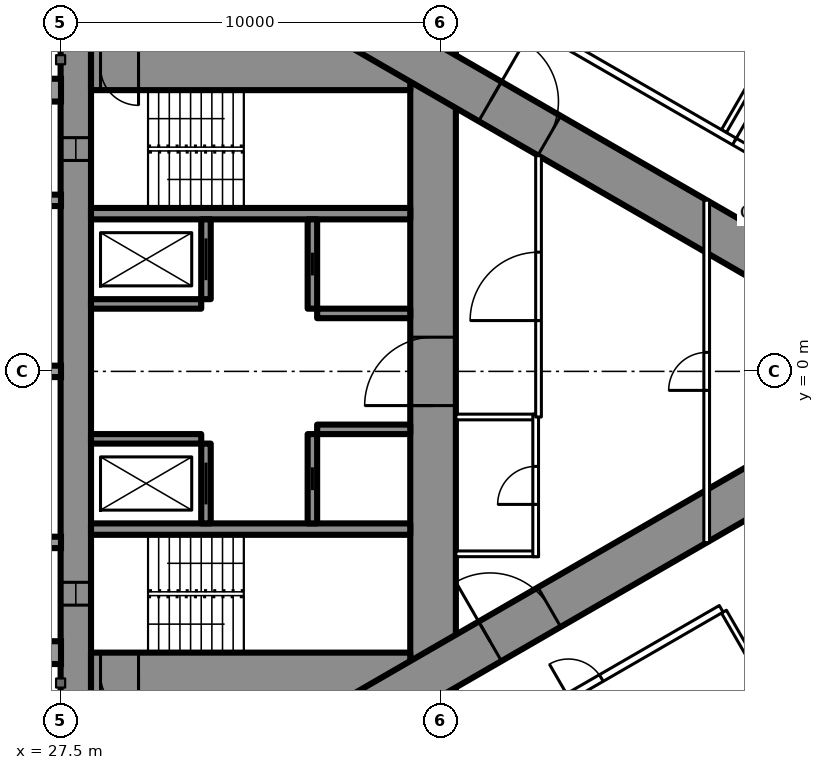
"""IFC4 building model, lengths in metres.
Left out: names, types, materials, properties, quantities, classifications, styles, units other than length and angle.
Written with IfcOpenShell. Run it as: python <this file> out.ifc"""

import sys

from ifc_helpers import new_model, si_unit, direction, frame, frame_2d, origin, place, context, subcontext, project, spatial, rectangle, extrude, element, fill, save


model = new_model("IFC4")
c1 = context("Model", 3, precision=1e-05, world=origin(), true_north=direction((0.0, 1.0)))
c2 = subcontext(c1, "Body", "Model", "MODEL_VIEW")
j1 = project(units=[si_unit("LENGTHUNIT", "METRE"), si_unit("PLANEANGLEUNIT", "RADIAN")], contexts=[c1])
p1 = place(None, origin())
s1 = spatial("IfcSite", under=j1, at=p1, CompositionType="ELEMENT")
p2 = place(p1, origin())
s2 = spatial("IfcBuilding", under=s1, at=p2, CompositionType="ELEMENT")
p3 = place(p2, frame((0.0, 0.0, 101.1)))
s3 = spatial("IfcBuildingStorey", under=s2, at=p3, CompositionType="ELEMENT", Elevation=101.1)
p4 = place(p3, frame((27.9, -8.6, 0.0), z_axis=(0.0, 0.0, 1.0), x_axis=(0.0, 1.0, 0.0)))
e1 = element("IfcWall", 1, at=p4, inside=s3, PredefinedType="SHEAR", context=c2, shape_type="SweptSolid", body=[
    extrude(rectangle(XDim=17.2, YDim=0.8, at=frame_2d((8.6, 0.0))), origin(), (0.0, 0.0, 1.0), 3.5),
])
p5 = place(p4, frame((2.45, 0.0, 0.6)))
e2 = element("IfcOpeningElement", 2, at=p5, cuts=e1, PredefinedType="OPENING", context=c2, shape_type="SweptSolid", body=[
    extrude(rectangle(XDim=0.6, YDim=2.1, at=frame_2d((0.3, 1.05))), frame((0.0, 0.41, 0.0), z_axis=(0.0, -1.0, 0.0), x_axis=(1.0, 0.0, 0.0)), (0.0, 0.0, 1.0), 0.82),
])
p6 = place(p4, frame((14.15, 0.0, 0.6)))
e3 = element("IfcOpeningElement", 3, at=p6, cuts=e1, PredefinedType="OPENING", context=c2, shape_type="SweptSolid", body=[
    extrude(rectangle(XDim=0.6, YDim=2.1, at=frame_2d((0.3, 1.05))), frame((0.0, 0.41, 0.0), z_axis=(0.0, -1.0, 0.0), x_axis=(1.0, 0.0, 0.0)), (0.0, 0.0, 1.0), 0.82),
])
p7 = place(p3, frame((37.3, -8.6, 0.0), z_axis=(0.0, 0.0, 1.0), x_axis=(0.0, 1.0, 0.0)))
e4 = element("IfcWall", 4, at=p7, inside=s3, PredefinedType="SHEAR", context=c2, shape_type="SweptSolid", body=[
    extrude(rectangle(XDim=17.2, YDim=1.2, at=frame_2d((8.6, 0.0))), origin(), (0.0, 0.0, 1.0), 3.5),
])
p8 = place(p7, frame((7.7, 0.0, 0.0)))
e5 = element("IfcOpeningElement", 5, at=p8, cuts=e4, PredefinedType="OPENING", context=c2, shape_type="SweptSolid", body=[
    extrude(rectangle(XDim=1.8, YDim=2.2, at=frame_2d((0.9, 1.1))), frame((0.0, 0.61, 0.0), z_axis=(0.0, -1.0, 0.0), x_axis=(1.0, 0.0, 0.0)), (0.0, 0.0, 1.0), 1.22),
])
p9 = place(p3, frame((28.3, -8.0, 0.0), z_axis=(0.0, 0.0, 1.0), x_axis=(1.0, 0.0, 0.0)))
e6 = element("IfcWall", 6, at=p9, inside=s3, PredefinedType="SHEAR", context=c2, shape_type="SweptSolid", body=[
    extrude(rectangle(XDim=8.4, YDim=1.2, at=frame_2d((4.2, 0.0))), origin(), (0.0, 0.0, 1.0), 3.5),
])
p10 = place(p9, frame((0.25, 0.0, 0.0)))
e7 = element("IfcOpeningElement", 7, at=p10, cuts=e6, PredefinedType="OPENING", context=c2, shape_type="SweptSolid", body=[
    extrude(rectangle(XDim=1.0, YDim=2.2, at=frame_2d((0.5, 1.1))), frame((0.0, 0.61, 0.0), z_axis=(0.0, -1.0, 0.0), x_axis=(1.0, 0.0, 0.0)), (0.0, 0.0, 1.0), 1.22),
])
p11 = place(p3, frame((28.3, 8.0, 0.0), z_axis=(0.0, 0.0, 1.0), x_axis=(1.0, 0.0, 0.0)))
e8 = element("IfcWall", 8, at=p11, inside=s3, PredefinedType="SHEAR", context=c2, shape_type="SweptSolid", body=[
    extrude(rectangle(XDim=8.4, YDim=1.2, at=frame_2d((4.2, 0.0))), origin(), (0.0, 0.0, 1.0), 3.5),
])
p12 = place(p11, frame((0.25, 0.0, 0.0)))
e9 = element("IfcOpeningElement", 9, at=p12, cuts=e8, PredefinedType="OPENING", context=c2, shape_type="SweptSolid", body=[
    extrude(rectangle(XDim=1.0, YDim=2.2, at=frame_2d((0.5, 1.1))), frame((0.0, 0.61, 0.0), z_axis=(0.0, -1.0, 0.0), x_axis=(1.0, 0.0, 0.0)), (0.0, 0.0, 1.0), 1.22),
])
for number, where, z_axis, x_axis in (
    (10, (28.3, -4.15, 0.0), (0.0, 0.0, 1.0), (1.0, 0.0, 0.0)),
    (11, (28.3, 4.15, 0.0), (0.0, 0.0, 1.0), (1.0, 0.0, 0.0)),
):
    element("IfcWall", number, at=place(p3, frame(where, z_axis=z_axis, x_axis=x_axis)), inside=s3, PredefinedType="SHEAR", context=c2, shape_type="SweptSolid", body=[
        extrude(rectangle(XDim=8.4, YDim=0.3, at=frame_2d((4.2, 0.0))), origin(), (0.0, 0.0, 1.0), 3.5),
    ])
p13 = place(p3, frame((31.325, -4.0, 0.0), z_axis=(0.0, 0.0, 1.0), x_axis=(0.0, 1.0, 0.0)))
e12 = element("IfcWall", 12, at=p13, inside=s3, PredefinedType="SHEAR", context=c2, shape_type="SweptSolid", body=[
    extrude(rectangle(XDim=2.1, YDim=0.25, at=frame_2d((1.05, 0.0))), origin(), (0.0, 0.0, 1.0), 3.5),
])
p14 = place(p13, frame((0.5, 0.0, 0.0)))
e13 = element("IfcOpeningElement", 13, at=p14, cuts=e12, PredefinedType="OPENING", context=c2, shape_type="SweptSolid", body=[
    extrude(rectangle(XDim=1.1, YDim=2.2, at=frame_2d((0.55, 1.1))), frame((0.0, 0.135, 0.0), z_axis=(0.0, -1.0, 0.0), x_axis=(1.0, 0.0, 0.0)), (0.0, 0.0, 1.0), 0.27),
])
p15 = place(p3, frame((34.125, -4.0, 0.0), z_axis=(0.0, 0.0, 1.0), x_axis=(0.0, 1.0, 0.0)))
e14 = element("IfcWall", 14, at=p15, inside=s3, PredefinedType="SHEAR", context=c2, shape_type="SweptSolid", body=[
    extrude(rectangle(XDim=2.35, YDim=0.25, at=frame_2d((1.175, 0.0))), origin(), (0.0, 0.0, 1.0), 3.5),
])
p16 = place(p15, frame((0.875, 0.0, 0.0)))
e15 = element("IfcOpeningElement", 15, at=p16, cuts=e14, PredefinedType="OPENING", context=c2, shape_type="SweptSolid", body=[
    extrude(rectangle(XDim=0.6, YDim=2.0, at=frame_2d((0.3, 1.0))), frame((0.0, 0.135, 0.0), z_axis=(0.0, -1.0, 0.0), x_axis=(1.0, 0.0, 0.0)), (0.0, 0.0, 1.0), 0.27),
])
p17 = place(p3, frame((28.3, -1.775, 0.0), z_axis=(0.0, 0.0, 1.0), x_axis=(1.0, 0.0, 0.0)))
e16 = element("IfcWall", 16, at=p17, inside=s3, PredefinedType="SHEAR", context=c2, shape_type="SweptSolid", body=[
    extrude(rectangle(XDim=2.9, YDim=0.25, at=frame_2d((1.45, 0.0))), origin(), (0.0, 0.0, 1.0), 3.5),
])
p18 = place(p3, frame((34.25, -1.525, 0.0), z_axis=(0.0, 0.0, 1.0), x_axis=(1.0, 0.0, 0.0)))
e17 = element("IfcWall", 17, at=p18, inside=s3, PredefinedType="SHEAR", context=c2, shape_type="SweptSolid", body=[
    extrude(rectangle(XDim=2.45, YDim=0.25, at=frame_2d((1.225, 0.0))), origin(), (0.0, 0.0, 1.0), 3.5),
])
p19 = place(p3, frame((31.325, 1.9, 0.0), z_axis=(0.0, 0.0, 1.0), x_axis=(0.0, 1.0, 0.0)))
e18 = element("IfcWall", 18, at=p19, inside=s3, PredefinedType="SHEAR", context=c2, shape_type="SweptSolid", body=[
    extrude(rectangle(XDim=2.1, YDim=0.25, at=frame_2d((1.05, 0.0))), origin(), (0.0, 0.0, 1.0), 3.5),
])
p20 = place(p19, frame((0.5, 0.0, 0.0)))
e19 = element("IfcOpeningElement", 19, at=p20, cuts=e18, PredefinedType="OPENING", context=c2, shape_type="SweptSolid", body=[
    extrude(rectangle(XDim=1.1, YDim=2.2, at=frame_2d((0.55, 1.1))), frame((0.0, 0.135, 0.0), z_axis=(0.0, -1.0, 0.0), x_axis=(1.0, 0.0, 0.0)), (0.0, 0.0, 1.0), 0.27),
])
p21 = place(p3, frame((34.125, 1.65, 0.0), z_axis=(0.0, 0.0, 1.0), x_axis=(0.0, 1.0, 0.0)))
e20 = element("IfcWall", 20, at=p21, inside=s3, PredefinedType="SHEAR", context=c2, shape_type="SweptSolid", body=[
    extrude(rectangle(XDim=2.35, YDim=0.25, at=frame_2d((1.175, 0.0))), origin(), (0.0, 0.0, 1.0), 3.5),
])
p22 = place(p21, frame((0.875, 0.0, 0.0)))
e21 = element("IfcOpeningElement", 21, at=p22, cuts=e20, PredefinedType="OPENING", context=c2, shape_type="SweptSolid", body=[
    extrude(rectangle(XDim=0.6, YDim=2.0, at=frame_2d((0.3, 1.0))), frame((0.0, 0.135, 0.0), z_axis=(0.0, -1.0, 0.0), x_axis=(1.0, 0.0, 0.0)), (0.0, 0.0, 1.0), 0.27),
])
p23 = place(p3, frame((28.3, 1.775, 0.0), z_axis=(0.0, 0.0, 1.0), x_axis=(1.0, 0.0, 0.0)))
e22 = element("IfcWall", 22, at=p23, inside=s3, PredefinedType="SHEAR", context=c2, shape_type="SweptSolid", body=[
    extrude(rectangle(XDim=2.9, YDim=0.25, at=frame_2d((1.45, 0.0))), origin(), (0.0, 0.0, 1.0), 3.5),
])
p24 = place(p3, frame((34.25, 1.525, 0.0), z_axis=(0.0, 0.0, 1.0), x_axis=(1.0, 0.0, 0.0)))
e23 = element("IfcWall", 23, at=p24, inside=s3, PredefinedType="SHEAR", context=c2, shape_type="SweptSolid", body=[
    extrude(rectangle(XDim=2.45, YDim=0.25, at=frame_2d((1.225, 0.0))), origin(), (0.0, 0.0, 1.0), 3.5),
])
p25 = place(p3, frame((27.2, -13.8, 0.0), z_axis=(0.0, 0.0, 1.0), x_axis=(0.866027159892, 0.499996958321, 0.0)))
e24 = element("IfcWall", 24, at=p25, inside=s3, PredefinedType="SHEAR", context=c2, shape_type="SweptSolid", body=[
    extrude(rectangle(XDim=27.947, YDim=1.2, at=frame_2d((13.973, 0.0))), origin(), (0.0, 0.0, 1.0), 3.5),
])
p26 = place(p25, frame((4.6, 0.0, 0.0)))
e25 = element("IfcOpeningElement", 25, at=p26, cuts=e24, PredefinedType="OPENING", context=c2, shape_type="SweptSolid", body=[
    extrude(rectangle(XDim=1.0, YDim=2.2, at=frame_2d((0.5, 1.1))), frame((0.0, 0.61, 0.0), z_axis=(0.0, -1.0, 0.0), x_axis=(1.0, 0.0, 0.0)), (0.0, 0.0, 1.0), 1.22),
])
p27 = place(p25, frame((13.395, 0.0, 0.0)))
e26 = element("IfcOpeningElement", 26, at=p27, cuts=e24, PredefinedType="OPENING", context=c2, shape_type="SweptSolid", body=[
    extrude(rectangle(XDim=1.8, YDim=2.2, at=frame_2d((0.9, 1.1))), frame((0.0, 0.61, 0.0), z_axis=(0.0, -1.0, 0.0), x_axis=(1.0, 0.0, 0.0)), (0.0, 0.0, 1.0), 1.22),
])
p28 = place(p3, frame((27.2, 13.8, 0.0), z_axis=(0.0, 0.0, 1.0), x_axis=(0.866024515034, -0.500001539357, 0.0)))
e27 = element("IfcWall", 27, at=p28, inside=s3, PredefinedType="SHEAR", context=c2, shape_type="SweptSolid", body=[
    extrude(rectangle(XDim=26.907, YDim=1.2, at=frame_2d((13.454, 0.0))), origin(), (0.0, 0.0, 1.0), 3.5),
])
p29 = place(p28, frame((4.6, 0.0, 0.0)))
e28 = element("IfcOpeningElement", 28, at=p29, cuts=e27, PredefinedType="OPENING", context=c2, shape_type="SweptSolid", body=[
    extrude(rectangle(XDim=1.0, YDim=2.2, at=frame_2d((0.5, 1.1))), frame((0.0, 0.61, 0.0), z_axis=(0.0, -1.0, 0.0), x_axis=(1.0, 0.0, 0.0)), (0.0, 0.0, 1.0), 1.22),
])
p30 = place(p28, frame((13.395, 0.0, 0.0)))
e29 = element("IfcOpeningElement", 29, at=p30, cuts=e27, PredefinedType="OPENING", context=c2, shape_type="SweptSolid", body=[
    extrude(rectangle(XDim=1.8, YDim=2.2, at=frame_2d((0.9, 1.1))), frame((0.0, 0.61, 0.0), z_axis=(0.0, -1.0, 0.0), x_axis=(1.0, 0.0, 0.0)), (0.0, 0.0, 1.0), 1.22),
])
p31 = place(p3, frame((44.954, -6.321, 0.0), z_axis=(0.0, 0.0, 1.0), x_axis=(0.500018676722, -0.866014620505, 0.0)))
e30 = element("IfcWall", 30, at=p31, inside=s3, PredefinedType="PARTITIONING", context=c2, shape_type="SweptSolid", body=[
    extrude(rectangle(XDim=8.704, YDim=0.15, at=frame_2d((4.352, 0.0))), origin(), (0.0, 0.0, 1.0), 2.2),
])
p32 = place(p3, frame((44.954, 6.321, 0.0), z_axis=(0.0, 0.0, 1.0), x_axis=(0.500009815811, 0.866019736549, 0.0)))
e31 = element("IfcWall", 31, at=p32, inside=s3, PredefinedType="PARTITIONING", context=c2, shape_type="SweptSolid", body=[
    extrude(rectangle(XDim=11.424, YDim=0.15, at=frame_2d((5.712, 0.0))), origin(), (0.0, 0.0, 1.0), 3.25),
])
p33 = place(p3, frame((36.834, 10.894, 0.0), z_axis=(0.0, 0.0, 1.0), x_axis=(0.866028157229, -0.499995230863, 0.0)))
e32 = element("IfcWall", 32, at=p33, inside=s3, PredefinedType="PARTITIONING", context=c2, shape_type="SweptSolid", body=[
    extrude(rectangle(XDim=21.667, YDim=0.2, at=frame_2d((10.833, 0.0))), origin(), (0.0, 0.0, 1.0), 3.25),
])
p34 = place(p33, frame((20.117, 0.0, 0.0)))
e33 = element("IfcOpeningElement", 33, at=p34, cuts=e32, PredefinedType="OPENING", context=c2, shape_type="SweptSolid", body=[
    extrude(rectangle(XDim=0.95, YDim=2.2, at=frame_2d((0.475, 1.1))), frame((0.0, 0.11, 0.0), z_axis=(0.0, -1.0, 0.0), x_axis=(1.0, 0.0, 0.0)), (0.0, 0.0, 1.0), 0.22),
])
p35 = place(p33, frame((14.335, 0.0, 0.0)))
e34 = element("IfcOpeningElement", 34, at=p35, cuts=e32, PredefinedType="OPENING", context=c2, shape_type="SweptSolid", body=[
    extrude(rectangle(XDim=0.95, YDim=2.2, at=frame_2d((0.475, 1.1))), frame((0.0, 0.11, 0.0), z_axis=(0.0, -1.0, 0.0), x_axis=(1.0, 0.0, 0.0)), (0.0, 0.0, 1.0), 0.22),
])
p36 = place(p33, frame((9.693, 0.0, 0.0)))
e35 = element("IfcOpeningElement", 35, at=p36, cuts=e32, PredefinedType="OPENING", context=c2, shape_type="SweptSolid", body=[
    extrude(rectangle(XDim=0.95, YDim=2.2, at=frame_2d((0.475, 1.1))), frame((0.0, 0.11, 0.0), z_axis=(0.0, -1.0, 0.0), x_axis=(1.0, 0.0, 0.0)), (0.0, 0.0, 1.0), 0.22),
])
p37 = place(p33, frame((2.95, 0.0, 0.0)))
e36 = element("IfcOpeningElement", 36, at=p37, cuts=e32, PredefinedType="OPENING", context=c2, shape_type="SweptSolid", body=[
    extrude(rectangle(XDim=0.95, YDim=2.2, at=frame_2d((0.475, 1.1))), frame((0.0, 0.11, 0.0), z_axis=(0.0, -1.0, 0.0), x_axis=(1.0, 0.0, 0.0)), (0.0, 0.0, 1.0), 0.22),
])
p38 = place(p3, frame((37.96, -10.243, 0.0), z_axis=(0.0, 0.0, 1.0), x_axis=(0.86603350054, 0.499985975746, 0.0)))
e37 = element("IfcWall", 37, at=p38, inside=s3, PredefinedType="PARTITIONING", context=c2, shape_type="SweptSolid", body=[
    extrude(rectangle(XDim=7.993, YDim=0.2, at=frame_2d((3.997, 0.0))), origin(), (0.0, 0.0, 1.0), 3.25),
])
p39 = place(p38, frame((3.35, 0.0, 0.0)))
e38 = element("IfcOpeningElement", 38, at=p39, cuts=e37, PredefinedType="OPENING", context=c2, shape_type="SweptSolid", body=[
    extrude(rectangle(XDim=1.0, YDim=2.2, at=frame_2d((0.5, 1.1))), frame((0.0, 0.11, 0.0), z_axis=(0.0, -1.0, 0.0), x_axis=(1.0, 0.0, 0.0)), (0.0, 0.0, 1.0), 0.22),
])
for number, where, z_axis, x_axis in (
    (39, (37.9, -1.2, 0.0), (0.0, 0.0, 1.0), (1.0, 0.0, 0.0)),
    (40, (37.9, -4.8, 0.0), (0.0, 0.0, 1.0), (1.0, 0.0, 0.0)),
):
    element("IfcWall", number, at=place(p3, frame(where, z_axis=z_axis, x_axis=x_axis)), inside=s3, PredefinedType="PARTITIONING", context=c2, shape_type="SweptSolid", body=[
        extrude(rectangle(XDim=2.175, YDim=0.15, at=frame_2d((1.087, 0.0))), origin(), (0.0, 0.0, 1.0), 3.25),
    ])
p40 = place(p3, frame((40.0, -4.875, 0.0), z_axis=(0.0, 0.0, 1.0), x_axis=(0.0, 1.0, 0.0)))
e41 = element("IfcWall", 41, at=p40, inside=s3, PredefinedType="PARTITIONING", context=c2, shape_type="SweptSolid", body=[
    extrude(rectangle(XDim=3.75, YDim=0.15, at=frame_2d((1.875, 0.0))), origin(), (0.0, 0.0, 1.0), 3.25),
])
p41 = place(p40, frame((1.375, 0.0, 0.0)))
e42 = element("IfcOpeningElement", 42, at=p41, cuts=e41, PredefinedType="OPENING", context=c2, shape_type="SweptSolid", body=[
    extrude(rectangle(XDim=1.0, YDim=2.2, at=frame_2d((0.5, 1.1))), frame((0.0, 0.085, 0.0), z_axis=(0.0, -1.0, 0.0), x_axis=(1.0, 0.0, 0.0)), (0.0, 0.0, 1.0), 0.17),
])
p42 = place(p3, frame((40.075, -1.2, 0.0), z_axis=(0.0, 0.0, 1.0), x_axis=(0.0, 1.0, 0.0)))
e43 = element("IfcWall", 43, at=p42, inside=s3, PredefinedType="PARTITIONING", context=c2, shape_type="SweptSolid", body=[
    extrude(rectangle(XDim=6.874, YDim=0.15, at=frame_2d((3.437, 0.0))), origin(), (0.0, 0.0, 1.0), 3.25),
])
p43 = place(p42, frame((2.537, 0.0, 0.0)))
e44 = element("IfcOpeningElement", 44, at=p43, cuts=e43, PredefinedType="OPENING", context=c2, shape_type="SweptSolid", body=[
    extrude(rectangle(XDim=1.8, YDim=2.2, at=frame_2d((0.9, 1.1))), frame((0.0, 0.085, 0.0), z_axis=(0.0, -1.0, 0.0), x_axis=(1.0, 0.0, 0.0)), (0.0, 0.0, 1.0), 0.17),
])
p44 = place(p3, frame((44.5, -4.505, 0.0), z_axis=(0.0, 0.0, 1.0), x_axis=(0.0, 1.0, 0.0)))
e45 = element("IfcWall", 45, at=p44, inside=s3, PredefinedType="PARTITIONING", context=c2, shape_type="SweptSolid", body=[
    extrude(rectangle(XDim=9.009, YDim=0.15, at=frame_2d((4.505, 0.0))), origin(), (0.0, 0.0, 1.0), 2.45),
])
p45 = place(p44, frame((4.005, 0.0, 0.0)))
e46 = element("IfcOpeningElement", 46, at=p45, cuts=e45, PredefinedType="OPENING", context=c2, shape_type="SweptSolid", body=[
    extrude(rectangle(XDim=1.0, YDim=2.2, at=frame_2d((0.5, 1.1))), frame((0.0, 0.085, 0.0), z_axis=(0.0, -1.0, 0.0), x_axis=(1.0, 0.0, 0.0)), (0.0, 0.0, 1.0), 0.17),
])
p46 = place(p36, origin())
e47 = element("IfcDoor", 47, at=p46, inside=s3, OperationType="SINGLE_SWING_LEFT", PredefinedType="DOOR", context=c2, shape_type="SweptSolid", body=[
    extrude(rectangle(XDim=0.95, YDim=2.2, at=frame_2d((0.475, 1.1))), frame((0.0, 0.025, 0.0), z_axis=(0.0, -1.0, 0.0), x_axis=(1.0, 0.0, 0.0)), (0.0, 0.0, 1.0), 0.05),
])
fill(e35, e47)
p47 = place(p39, origin())
e48 = element("IfcDoor", 48, at=p47, inside=s3, OperationType="SINGLE_SWING_LEFT", PredefinedType="DOOR", context=c2, shape_type="SweptSolid", body=[
    extrude(rectangle(XDim=1.0, YDim=2.2, at=frame_2d((0.5, 1.1))), frame((0.0, 0.025, 0.0), z_axis=(0.0, -1.0, 0.0), x_axis=(1.0, 0.0, 0.0)), (0.0, 0.0, 1.0), 0.05),
])
fill(e38, e48)
p48 = place(p41, origin())
e49 = element("IfcDoor", 49, at=p48, inside=s3, OperationType="SINGLE_SWING_LEFT", PredefinedType="DOOR", context=c2, shape_type="SweptSolid", body=[
    extrude(rectangle(XDim=1.0, YDim=2.2, at=frame_2d((0.5, 1.1))), frame((0.0, 0.025, 0.0), z_axis=(0.0, -1.0, 0.0), x_axis=(1.0, 0.0, 0.0)), (0.0, 0.0, 1.0), 0.05),
])
fill(e42, e49)
p49 = place(p43, origin())
e50 = element("IfcDoor", 50, at=p49, inside=s3, OperationType="DOUBLE_DOOR_SINGLE_SWING", PredefinedType="DOOR", context=c2, shape_type="SweptSolid", body=[
    extrude(rectangle(XDim=1.8, YDim=2.2, at=frame_2d((0.9, 1.1))), frame((0.0, 0.025, 0.0), z_axis=(0.0, -1.0, 0.0), x_axis=(1.0, 0.0, 0.0)), (0.0, 0.0, 1.0), 0.05),
])
fill(e44, e50)
p50 = place(p45, origin())
e51 = element("IfcDoor", 51, at=p50, inside=s3, OperationType="SINGLE_SWING_LEFT", PredefinedType="DOOR", context=c2, shape_type="SweptSolid", body=[
    extrude(rectangle(XDim=1.0, YDim=2.2, at=frame_2d((0.5, 1.1))), frame((0.0, 0.025, 0.0), z_axis=(0.0, -1.0, 0.0), x_axis=(1.0, 0.0, 0.0)), (0.0, 0.0, 1.0), 0.05),
])
fill(e46, e51)
p51 = place(p27, origin())
e52 = element("IfcDoor", 52, at=p51, inside=s3, OperationType="DOUBLE_DOOR_SINGLE_SWING", PredefinedType="DOOR", context=c2, shape_type="SweptSolid", body=[
    extrude(rectangle(XDim=1.8, YDim=2.2, at=frame_2d((0.9, 1.1))), frame((0.0, 0.025, 0.0), z_axis=(0.0, -1.0, 0.0), x_axis=(1.0, 0.0, 0.0)), (0.0, 0.0, 1.0), 0.05),
])
fill(e26, e52)
p52 = place(p30, origin())
e53 = element("IfcDoor", 53, at=p52, inside=s3, OperationType="DOUBLE_DOOR_SINGLE_SWING", PredefinedType="DOOR", context=c2, shape_type="SweptSolid", body=[
    extrude(rectangle(XDim=1.8, YDim=2.2, at=frame_2d((0.9, 1.1))), frame((0.0, 0.025, 0.0), z_axis=(0.0, -1.0, 0.0), x_axis=(1.0, 0.0, 0.0)), (0.0, 0.0, 1.0), 0.05),
])
fill(e29, e53)
p53 = place(p8, origin())
e54 = element("IfcDoor", 54, at=p53, inside=s3, OperationType="DOUBLE_DOOR_SINGLE_SWING", PredefinedType="DOOR", context=c2, shape_type="SweptSolid", body=[
    extrude(rectangle(XDim=1.8, YDim=2.2, at=frame_2d((0.9, 1.1))), frame((0.0, 0.025, 0.0), z_axis=(0.0, -1.0, 0.0), x_axis=(1.0, 0.0, 0.0)), (0.0, 0.0, 1.0), 0.05),
])
fill(e5, e54)
p54 = place(p10, origin())
e55 = element("IfcDoor", 55, at=p54, inside=s3, OperationType="SINGLE_SWING_RIGHT", PredefinedType="DOOR", context=c2, shape_type="SweptSolid", body=[
    extrude(rectangle(XDim=1.0, YDim=2.2, at=frame_2d((0.5, 1.1))), frame((0.0, 0.025, 0.0), z_axis=(0.0, -1.0, 0.0), x_axis=(1.0, 0.0, 0.0)), (0.0, 0.0, 1.0), 0.05),
])
fill(e7, e55)
p55 = place(p12, origin())
e56 = element("IfcDoor", 56, at=p55, inside=s3, OperationType="SINGLE_SWING_RIGHT", PredefinedType="DOOR", context=c2, shape_type="SweptSolid", body=[
    extrude(rectangle(XDim=1.0, YDim=2.2, at=frame_2d((0.5, 1.1))), frame((0.0, 0.025, 0.0), z_axis=(0.0, -1.0, 0.0), x_axis=(1.0, 0.0, 0.0)), (0.0, 0.0, 1.0), 0.05),
])
fill(e9, e56)
p56 = place(p14, origin())
e57 = element("IfcDoor", 57, at=p56, inside=s3, OperationType="SLIDING_TO_LEFT", PredefinedType="USERDEFINED", context=c2, shape_type="SweptSolid", body=[
    extrude(rectangle(XDim=1.1, YDim=2.2, at=frame_2d((0.55, 1.1))), frame((0.0, 0.025, 0.0), z_axis=(0.0, -1.0, 0.0), x_axis=(1.0, 0.0, 0.0)), (0.0, 0.0, 1.0), 0.05),
])
fill(e13, e57)
p57 = place(p20, origin())
e58 = element("IfcDoor", 58, at=p57, inside=s3, OperationType="SLIDING_TO_LEFT", PredefinedType="USERDEFINED", context=c2, shape_type="SweptSolid", body=[
    extrude(rectangle(XDim=1.1, YDim=2.2, at=frame_2d((0.55, 1.1))), frame((0.0, 0.025, 0.0), z_axis=(0.0, -1.0, 0.0), x_axis=(1.0, 0.0, 0.0)), (0.0, 0.0, 1.0), 0.05),
])
fill(e19, e58)
p58 = place(p16, origin())
e59 = element("IfcDoor", 59, at=p58, inside=s3, OperationType="SLIDING_TO_LEFT", PredefinedType="DOOR", context=c2, shape_type="SweptSolid", body=[
    extrude(rectangle(XDim=0.6, YDim=2.0, at=frame_2d((0.3, 1.0))), frame((0.0, 0.025, 0.0), z_axis=(0.0, -1.0, 0.0), x_axis=(1.0, 0.0, 0.0)), (0.0, 0.0, 1.0), 0.05),
])
fill(e15, e59)
p59 = place(p22, origin())
e60 = element("IfcDoor", 60, at=p59, inside=s3, OperationType="SLIDING_TO_LEFT", PredefinedType="DOOR", context=c2, shape_type="SweptSolid", body=[
    extrude(rectangle(XDim=0.6, YDim=2.0, at=frame_2d((0.3, 1.0))), frame((0.0, 0.025, 0.0), z_axis=(0.0, -1.0, 0.0), x_axis=(1.0, 0.0, 0.0)), (0.0, 0.0, 1.0), 0.05),
])
fill(e21, e60)
p60 = place(p5, origin())
e61 = element("IfcWindow", 61, at=p60, inside=s3, PartitioningType="SINGLE_PANEL", PredefinedType="WINDOW", context=c2, shape_type="SweptSolid", body=[
    extrude(rectangle(XDim=0.6, YDim=2.1, at=frame_2d((0.3, 1.05))), frame((0.0, 0.03, 0.0), z_axis=(0.0, -1.0, 0.0), x_axis=(1.0, 0.0, 0.0)), (0.0, 0.0, 1.0), 0.06),
])
fill(e2, e61)
p61 = place(p6, origin())
e62 = element("IfcWindow", 62, at=p61, inside=s3, PartitioningType="SINGLE_PANEL", PredefinedType="WINDOW", context=c2, shape_type="SweptSolid", body=[
    extrude(rectangle(XDim=0.6, YDim=2.1, at=frame_2d((0.3, 1.05))), frame((0.0, 0.03, 0.0), z_axis=(0.0, -1.0, 0.0), x_axis=(1.0, 0.0, 0.0)), (0.0, 0.0, 1.0), 0.06),
])
fill(e3, e62)
save(model, sys.argv[1])
